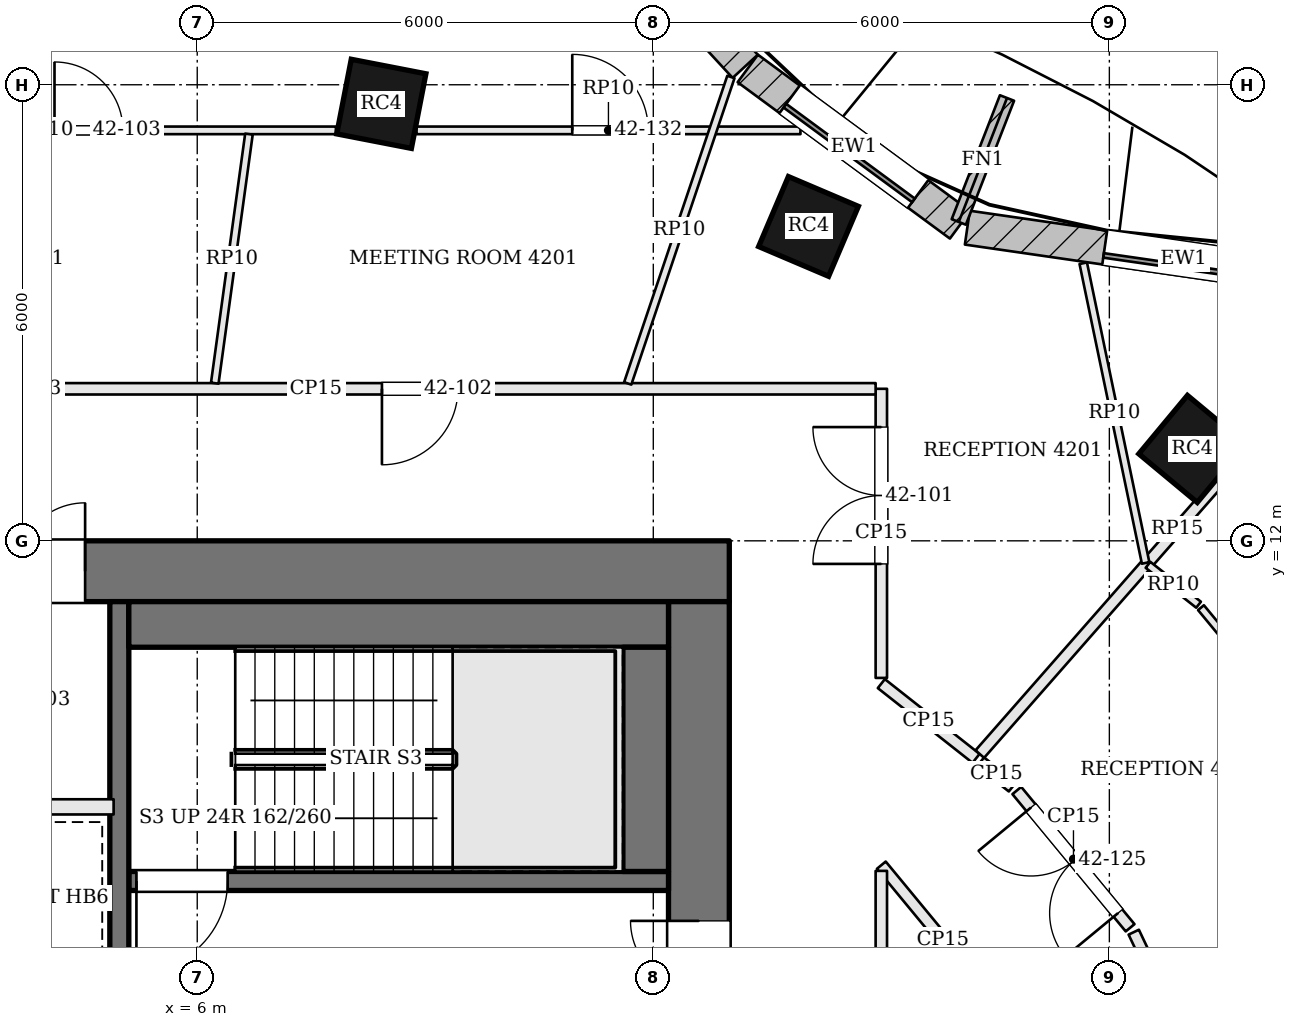
"""IFC4 building model, lengths in metres.
Left out: names, types, materials, properties, quantities, classifications, styles, units other than length and angle.
Written with IfcOpenShell. Run it as: python <this file> out.ifc"""

import sys

from ifc_helpers import new_model, si_unit, direction, frame, frame_2d, origin, origin_2d, place, context, subcontext, project, spatial, rectangle, extrude, element, fill, save


model = new_model("IFC4")
c1 = context("Model", 3, precision=1e-05, world=origin(), true_north=direction((0.0, 1.0)))
c2 = subcontext(c1, "Body", "Model", "MODEL_VIEW")
j1 = project(units=[si_unit("LENGTHUNIT", "METRE"), si_unit("PLANEANGLEUNIT", "RADIAN")], contexts=[c1])
p1 = place(None, origin())
s1 = spatial("IfcSite", under=j1, at=p1, CompositionType="ELEMENT")
p2 = place(p1, origin())
s2 = spatial("IfcBuilding", under=s1, at=p2, CompositionType="ELEMENT")
p3 = place(p2, frame((0.0, 0.0, 174.0)))
s3 = spatial("IfcBuildingStorey", under=s2, at=p3, CompositionType="ELEMENT", Elevation=174.0)
p4 = place(p3, frame((-13.0, 11.6, 0.0), z_axis=(0.0, 0.0, 1.0), x_axis=(1.0, 0.0, 0.0)))
e1 = element("IfcWall", 1, at=p4, inside=s3, PredefinedType="SHEAR", context=c2, shape_type="SweptSolid", body=[
    extrude(rectangle(XDim=26.0, YDim=0.8, at=frame_2d((13.0, 0.0))), origin(), (0.0, 0.0, 1.0), 3.9),
])
p5 = place(p4, frame((9.375, 0.0, 0.0)))
e2 = element("IfcOpeningElement", 2, at=p5, cuts=e1, PredefinedType="OPENING", context=c2, shape_type="SweptSolid", body=[
    extrude(rectangle(XDim=0.7, YDim=2.1, at=frame_2d((0.35, 1.05))), frame((0.0, 0.41, 0.0), z_axis=(0.0, -1.0, 0.0), x_axis=(1.0, 0.0, 0.0)), (0.0, 0.0, 1.0), 0.82),
])
p6 = place(p4, frame((12.075, 0.0, 0.0)))
e3 = element("IfcOpeningElement", 3, at=p6, cuts=e1, PredefinedType="OPENING", context=c2, shape_type="SweptSolid", body=[
    extrude(rectangle(XDim=1.0, YDim=2.1, at=frame_2d((0.5, 1.05))), frame((0.0, 0.41, 0.0), z_axis=(0.0, -1.0, 0.0), x_axis=(1.0, 0.0, 0.0)), (0.0, 0.0, 1.0), 0.82),
])
p7 = place(p4, frame((14.675, 0.0, 0.0)))
e4 = element("IfcOpeningElement", 4, at=p7, cuts=e1, PredefinedType="OPENING", context=c2, shape_type="SweptSolid", body=[
    extrude(rectangle(XDim=0.7, YDim=2.1, at=frame_2d((0.35, 1.05))), frame((0.0, 0.41, 0.0), z_axis=(0.0, -1.0, 0.0), x_axis=(1.0, 0.0, 0.0)), (0.0, 0.0, 1.0), 0.82),
])
p8 = place(p4, frame((16.625, 0.0, 0.0)))
e5 = element("IfcOpeningElement", 5, at=p8, cuts=e1, PredefinedType="OPENING", context=c2, shape_type="SweptSolid", body=[
    extrude(rectangle(XDim=0.9, YDim=2.1, at=frame_2d((0.45, 1.05))), frame((0.0, 0.41, 0.0), z_axis=(0.0, -1.0, 0.0), x_axis=(1.0, 0.0, 0.0)), (0.0, 0.0, 1.0), 0.82),
])
p9 = place(p3, frame((12.6, -2.2, 0.0), z_axis=(0.0, 0.0, 1.0), x_axis=(0.0, 1.0, 0.0)))
e6 = element("IfcWall", 6, at=p9, inside=s3, PredefinedType="SHEAR", context=c2, shape_type="SweptSolid", body=[
    extrude(rectangle(XDim=13.4, YDim=0.8, at=frame_2d((6.7, 0.0))), origin(), (0.0, 0.0, 1.0), 3.9),
])
p10 = place(p9, frame((7.4, 0.0, 0.0)))
e7 = element("IfcOpeningElement", 7, at=p10, cuts=e6, PredefinedType="OPENING", context=c2, shape_type="SweptSolid", body=[
    extrude(rectangle(XDim=1.8, YDim=2.1, at=frame_2d((0.9, 1.05))), frame((0.0, 0.41, 0.0), z_axis=(0.0, -1.0, 0.0), x_axis=(1.0, 0.0, 0.0)), (0.0, 0.0, 1.0), 0.82),
])
for number, where, z_axis, x_axis in (
    (8, (19.092, 13.209, -0.7), (0.0, 0.0, 1.0), (-0.769, 0.639, 0.0)),
    (9, (14.042, 16.136, -0.7), (0.0, 0.0, 1.0), (-0.92, 0.392, 0.0)),
    (10, (8.422, 17.749, -0.7), (0.0, 0.0, 1.0), (-0.982, 0.191, 0.0)),
):
    element("IfcColumn", number, at=place(p3, frame(where, z_axis=z_axis, x_axis=x_axis)), inside=s3, PredefinedType="COLUMN", context=c2, shape_type="SweptSolid", body=[
        extrude(rectangle(XDim=1.0, YDim=1.0, at=origin_2d()), origin(), (0.0, 0.0, 1.0), 4.6),
    ])
p11 = place(p3, frame((21.825, 15.297, 0.0), z_axis=(0.0, 0.0, 1.0), x_axis=(-0.98971474215, 0.143054986527, 0.0)))
e11 = element("IfcWall", 11, at=p11, inside=s3, PredefinedType="SOLIDWALL", context=c2, shape_type="SweptSolid", body=[
    extrude(rectangle(XDim=5.753, YDim=0.45, at=frame_2d((2.876, 0.0))), origin(), (0.0, 0.0, 1.0), 3.7),
])
p12 = place(p11, frame((1.826, 0.0, 0.9)))
e12 = element("IfcOpeningElement", 12, at=p12, cuts=e11, PredefinedType="OPENING", context=c2, shape_type="SweptSolid", body=[
    extrude(rectangle(XDim=2.1, YDim=2.3, at=frame_2d((1.05, 1.15))), frame((0.0, 0.235, 0.0), z_axis=(0.0, -1.0, 0.0), x_axis=(1.0, 0.0, 0.0)), (0.0, 0.0, 1.0), 0.47),
])
p13 = place(p3, frame((16.036, 16.158, 0.0), z_axis=(0.0, 0.0, 1.0), x_axis=(-0.805181432967, 0.593028549064, 0.0)))
e13 = element("IfcWall", 13, at=p13, inside=s3, PredefinedType="SOLIDWALL", context=c2, shape_type="SweptSolid", body=[
    extrude(rectangle(XDim=3.469, YDim=0.45, at=frame_2d((1.734, 0.0))), origin(), (0.0, 0.0, 1.0), 3.7),
])
p14 = place(p13, frame((0.684, 0.0, 0.9)))
e14 = element("IfcOpeningElement", 14, at=p14, cuts=e13, PredefinedType="OPENING", context=c2, shape_type="SweptSolid", body=[
    extrude(rectangle(XDim=2.1, YDim=2.3, at=frame_2d((1.05, 1.15))), frame((0.0, 0.235, 0.0), z_axis=(0.0, -1.0, 0.0), x_axis=(1.0, 0.0, 0.0)), (0.0, 0.0, 1.0), 0.47),
])
p15 = place(p3, frame((13.209, 18.243, 0.0), z_axis=(0.0, 0.0, 1.0), x_axis=(-0.677612152497, 0.735419452278, 0.0)))
e15 = element("IfcWall", 15, at=p15, inside=s3, PredefinedType="SOLIDWALL", context=c2, shape_type="SweptSolid", body=[
    extrude(rectangle(XDim=3.797, YDim=0.45, at=frame_2d((1.898, 0.0))), origin(), (0.0, 0.0, 1.0), 3.7),
])
p16 = place(p15, frame((0.848, 0.0, 0.9)))
e16 = element("IfcOpeningElement", 16, at=p16, cuts=e15, PredefinedType="OPENING", context=c2, shape_type="SweptSolid", body=[
    extrude(rectangle(XDim=2.1, YDim=2.3, at=frame_2d((1.05, 1.15))), frame((0.0, 0.235, 0.0), z_axis=(0.0, -1.0, 0.0), x_axis=(1.0, 0.0, 0.0)), (0.0, 0.0, 1.0), 0.47),
])
p17 = place(p3, frame((16.019, 16.195, 0.0), z_axis=(0.0, 0.0, 1.0), x_axis=(0.362641522028, 0.931928713208, 0.0)))
e17 = element("IfcWall", 17, at=p17, inside=s3, PredefinedType="SOLIDWALL", context=c2, shape_type="SweptSolid", body=[
    extrude(rectangle(XDim=1.75, YDim=0.2, at=frame_2d((0.875, 0.0))), origin(), (0.0, 0.0, 1.0), 3.7),
])
p18 = place(p3, frame((12.2, 7.525, 0.0), z_axis=(0.0, 0.0, 1.0), x_axis=(-1.0, 0.0, 0.0)))
e18 = element("IfcWall", 18, at=p18, inside=s3, PredefinedType="SOLIDWALL", context=c2, shape_type="SweptSolid", body=[
    extrude(rectangle(XDim=7.1, YDim=0.25, at=frame_2d((3.55, 0.0))), origin(), (0.0, 0.0, 1.0), 3.7),
])
p19 = place(p18, frame((5.8, 0.0, 0.0)))
e19 = element("IfcOpeningElement", 19, at=p19, cuts=e18, PredefinedType="OPENING", context=c2, shape_type="SweptSolid", body=[
    extrude(rectangle(XDim=1.2, YDim=2.1, at=frame_2d((0.6, 1.05))), frame((0.0, 0.135, 0.0), z_axis=(0.0, -1.0, 0.0), x_axis=(1.0, 0.0, 0.0)), (0.0, 0.0, 1.0), 0.27),
])
p20 = place(p3, frame((4.975, 11.2, 0.0), z_axis=(0.0, 0.0, 1.0), x_axis=(0.0, -1.0, 0.0)))
e20 = element("IfcWall", 20, at=p20, inside=s3, PredefinedType="SOLIDWALL", context=c2, shape_type="SweptSolid", body=[
    extrude(rectangle(XDim=13.4, YDim=0.25, at=frame_2d((6.7, 0.0))), origin(), (0.0, 0.0, 1.0), 3.7),
])
p21 = place(p20, frame((5.25, 0.0, 0.0)))
e21 = element("IfcOpeningElement", 21, at=p21, cuts=e20, PredefinedType="OPENING", context=c2, shape_type="SweptSolid", body=[
    extrude(rectangle(XDim=1.2, YDim=2.1, at=frame_2d((0.6, 1.05))), frame((0.0, 0.135, 0.0), z_axis=(0.0, -1.0, 0.0), x_axis=(1.0, 0.0, 0.0)), (0.0, 0.0, 1.0), 0.27),
])
p22 = place(p3, frame((12.2, 10.9, 0.0), z_axis=(0.0, 0.0, 1.0), x_axis=(-1.0, 0.0, 0.0)))
e22 = element("IfcWall", 22, at=p22, inside=s3, PredefinedType="SOLIDWALL", context=c2, shape_type="SweptSolid", body=[
    extrude(rectangle(XDim=7.1, YDim=0.6, at=frame_2d((3.55, 0.0))), origin(), (0.0, 0.0, 1.0), 3.7),
])
p23 = place(p3, frame((11.9, 10.6, 0.0), z_axis=(0.0, 0.0, 1.0), x_axis=(0.0, -1.0, 0.0)))
e23 = element("IfcWall", 23, at=p23, inside=s3, PredefinedType="SOLIDWALL", context=c2, shape_type="SweptSolid", body=[
    extrude(rectangle(XDim=2.95, YDim=0.6, at=frame_2d((1.475, 0.0))), origin(), (0.0, 0.0, 1.0), 3.7),
])
p24 = place(p3, frame((-4.9, 8.5, 0.0), z_axis=(0.0, 0.0, 1.0), x_axis=(1.0, 0.0, 0.0)))
e24 = element("IfcWall", 24, at=p24, inside=s3, PredefinedType="SOLIDWALL", context=c2, shape_type="SweptSolid", body=[
    extrude(rectangle(XDim=9.8, YDim=0.2, at=frame_2d((4.9, 0.0))), origin(), (0.0, 0.0, 1.0), 3.7),
])
p25 = place(p3, frame((16.246, 9.138, 0.0), z_axis=(0.0, 0.0, 1.0), x_axis=(-0.785126783061, 0.619335074512, 0.0)))
e25 = element("IfcWall", 25, at=p25, inside=s3, PredefinedType="PARTITIONING", context=c2, shape_type="SweptSolid", body=[
    extrude(rectangle(XDim=1.587, YDim=0.15, at=frame_2d((0.794, 0.0))), origin(), (0.0, 0.0, 1.0), 3.084),
])
p26 = place(p3, frame((15.0, 10.196, 0.0), z_axis=(0.0, 0.0, 1.0), x_axis=(0.0, 1.0, 0.0)))
e26 = element("IfcWall", 26, at=p26, inside=s3, PredefinedType="PARTITIONING", context=c2, shape_type="SweptSolid", body=[
    extrude(rectangle(XDim=3.804, YDim=0.15, at=frame_2d((1.902, 0.0))), origin(), (0.0, 0.0, 1.0), 3.084),
])
p27 = place(p26, frame((1.5, 0.0, 0.0)))
e27 = element("IfcOpeningElement", 27, at=p27, cuts=e26, PredefinedType="OPENING", context=c2, shape_type="SweptSolid", body=[
    extrude(rectangle(XDim=1.8, YDim=2.1, at=frame_2d((0.9, 1.05))), frame((0.0, 0.085, 0.0), z_axis=(0.0, -1.0, 0.0), x_axis=(1.0, 0.0, 0.0)), (0.0, 0.0, 1.0), 0.17),
])
p28 = place(p3, frame((14.925, 14.0, 0.0), z_axis=(0.0, 0.0, 1.0), x_axis=(-1.0, 0.0, 0.0)))
e28 = element("IfcWall", 28, at=p28, inside=s3, PredefinedType="PARTITIONING", context=c2, shape_type="SweptSolid", body=[
    extrude(rectangle(XDim=14.725, YDim=0.15, at=frame_2d((7.362, 0.0))), origin(), (0.0, 0.0, 1.0), 3.084),
])
p29 = place(p28, frame((5.495, 0.0, 0.0)))
e29 = element("IfcOpeningElement", 29, at=p29, cuts=e28, PredefinedType="OPENING", context=c2, shape_type="SweptSolid", body=[
    extrude(rectangle(XDim=1.0, YDim=2.4, at=frame_2d((0.5, 1.2))), frame((0.0, 0.085, 0.0), z_axis=(0.0, -1.0, 0.0), x_axis=(1.0, 0.0, 0.0)), (0.0, 0.0, 1.0), 0.17),
])
p30 = place(p28, frame((11.15, 0.0, 0.0)))
e30 = element("IfcOpeningElement", 30, at=p30, cuts=e28, PredefinedType="OPENING", context=c2, shape_type="SweptSolid", body=[
    extrude(rectangle(XDim=1.0, YDim=2.1, at=frame_2d((0.5, 1.05))), frame((0.0, 0.085, 0.0), z_axis=(0.0, -1.0, 0.0), x_axis=(1.0, 0.0, 0.0)), (0.0, 0.0, 1.0), 0.17),
])
p31 = place(p3, frame((21.493, 15.114, 0.0), z_axis=(0.0, 0.0, 1.0), x_axis=(-0.659778549164, -0.751460089467, 0.0)))
e31 = element("IfcWall", 31, at=p31, inside=s3, PredefinedType="PARTITIONING", context=c2, shape_type="SweptSolid", body=[
    extrude(rectangle(XDim=7.877, YDim=0.15, at=frame_2d((3.938, 0.0))), origin(), (0.0, 0.0, 1.0), 3.234),
])
p32 = place(p3, frame((26.367, 8.789, 0.0), z_axis=(0.0, 0.0, 1.0), x_axis=(-0.913673557468, -0.406448804137, 0.0)))
e32 = element("IfcWall", 32, at=p32, inside=s3, PredefinedType="PARTITIONING", context=c2, shape_type="SweptSolid", body=[
    extrude(rectangle(XDim=8.029, YDim=0.15, at=frame_2d((4.014, 0.0))), origin(), (0.0, 0.0, 1.0), 3.234),
])
p33 = place(p3, frame((18.931, 5.563, 0.0), z_axis=(0.0, 0.0, 1.0), x_axis=(-0.428204145682, 0.903682029046, 0.0)))
e33 = element("IfcWall", 33, at=p33, inside=s3, PredefinedType="PARTITIONING", context=c2, shape_type="SweptSolid", body=[
    extrude(rectangle(XDim=1.425, YDim=0.15, at=frame_2d((0.713, 0.0))), origin(), (0.0, 0.0, 1.0), 3.084),
])
p34 = place(p3, frame((18.273, 6.909, 0.0), z_axis=(0.0, 0.0, 1.0), x_axis=(-0.63653648943, 0.771246586783, 0.0)))
e34 = element("IfcWall", 34, at=p34, inside=s3, PredefinedType="PARTITIONING", context=c2, shape_type="SweptSolid", body=[
    extrude(rectangle(XDim=2.342, YDim=0.15, at=frame_2d((1.171, 0.0))), origin(), (0.0, 0.0, 1.0), 3.084),
])
p35 = place(p34, frame((0.25, 0.0, 0.0)))
e35 = element("IfcOpeningElement", 35, at=p35, cuts=e34, PredefinedType="OPENING", context=c2, shape_type="SweptSolid", body=[
    extrude(rectangle(XDim=1.8, YDim=2.1, at=frame_2d((0.9, 1.05))), frame((0.0, 0.085, 0.0), z_axis=(0.0, -1.0, 0.0), x_axis=(1.0, 0.0, 0.0)), (0.0, 0.0, 1.0), 0.17),
])
p36 = place(p3, frame((16.724, 8.761, 0.0), z_axis=(0.0, 0.0, 1.0), x_axis=(-0.785093642841, 0.619377083827, 0.0)))
e36 = element("IfcWall", 36, at=p36, inside=s3, PredefinedType="PARTITIONING", context=c2, shape_type="SweptSolid", body=[
    extrude(rectangle(XDim=0.533, YDim=0.15, at=frame_2d((0.267, 0.0))), origin(), (0.0, 0.0, 1.0), 3.084),
])
p37 = place(p3, frame((15.0, 7.733, 0.0), z_axis=(0.0, 0.0, 1.0), x_axis=(0.636601263488, -0.771193121938, 0.0)))
e37 = element("IfcWall", 37, at=p37, inside=s3, PredefinedType="PARTITIONING", context=c2, shape_type="SweptSolid", body=[
    extrude(rectangle(XDim=2.545, YDim=0.15, at=frame_2d((1.272, 0.0))), origin(), (0.0, 0.0, 1.0), 3.084),
])
p38 = place(p3, frame((15.0, -4.925, 0.0), z_axis=(0.0, 0.0, 1.0), x_axis=(0.0, 1.0, 0.0)))
e38 = element("IfcWall", 38, at=p38, inside=s3, PredefinedType="PARTITIONING", context=c2, shape_type="SweptSolid", body=[
    extrude(rectangle(XDim=12.583, YDim=0.15, at=frame_2d((6.292, 0.0))), origin(), (0.0, 0.0, 1.0), 3.084),
])
p39 = place(p38, frame((6.441, 0.0, 0.0)))
e39 = element("IfcOpeningElement", 39, at=p39, cuts=e38, PredefinedType="OPENING", context=c2, shape_type="SweptSolid", body=[
    extrude(rectangle(XDim=0.7, YDim=2.1, at=frame_2d((0.35, 1.05))), frame((0.0, 0.085, 0.0), z_axis=(0.0, -1.0, 0.0), x_axis=(1.0, 0.0, 0.0)), (0.0, 0.0, 1.0), 0.17),
])
p40 = place(p3, frame((0.228, 17.4, 0.0), z_axis=(0.0, 0.0, 1.0), x_axis=(1.0, 0.0, 0.0)))
e40 = element("IfcWall", 40, at=p40, inside=s3, PredefinedType="PARTITIONING", context=c2, shape_type="SweptSolid", body=[
    extrude(rectangle(XDim=7.596, YDim=0.1, at=frame_2d((3.798, 0.0))), origin(), (0.0, 0.0, 1.0), 3.084),
])
p41 = place(p40, frame((3.894, 0.0, 0.0)))
e41 = element("IfcOpeningElement", 41, at=p41, cuts=e40, PredefinedType="OPENING", context=c2, shape_type="SweptSolid", body=[
    extrude(rectangle(XDim=0.9, YDim=2.1, at=frame_2d((0.45, 1.05))), frame((0.0, 0.06, 0.0), z_axis=(0.0, -1.0, 0.0), x_axis=(1.0, 0.0, 0.0)), (0.0, 0.0, 1.0), 0.12),
])
p42 = place(p3, frame((8.884, 17.4, 0.0), z_axis=(0.0, 0.0, 1.0), x_axis=(1.0, 0.0, 0.0)))
e42 = element("IfcWall", 42, at=p42, inside=s3, PredefinedType="PARTITIONING", context=c2, shape_type="SweptSolid", body=[
    extrude(rectangle(XDim=5.052, YDim=0.1, at=frame_2d((2.526, 0.0))), origin(), (0.0, 0.0, 1.0), 3.084),
])
p43 = place(p42, frame((2.05, 0.0, 0.0)))
e43 = element("IfcOpeningElement", 43, at=p43, cuts=e42, PredefinedType="OPENING", context=c2, shape_type="SweptSolid", body=[
    extrude(rectangle(XDim=1.0, YDim=2.4, at=frame_2d((0.5, 1.2))), frame((0.0, 0.06, 0.0), z_axis=(0.0, -1.0, 0.0), x_axis=(1.0, 0.0, 0.0)), (0.0, 0.0, 1.0), 0.12),
])
p44 = place(p3, frame((17.656, 15.652, 0.0), z_axis=(0.0, 0.0, 1.0), x_axis=(0.203733969948, -0.979026286414, 0.0)))
e44 = element("IfcWall", 44, at=p44, inside=s3, PredefinedType="PARTITIONING", context=c2, shape_type="SweptSolid", body=[
    extrude(rectangle(XDim=4.028, YDim=0.1, at=frame_2d((2.014, 0.0))), origin(), (0.0, 0.0, 1.0), 3.084),
])
p45 = place(p3, frame((11.664, 14.071, 0.0), z_axis=(0.0, 0.0, 1.0), x_axis=(0.319050122348, 0.947737843198, 0.0)))
e45 = element("IfcWall", 45, at=p45, inside=s3, PredefinedType="PARTITIONING", context=c2, shape_type="SweptSolid", body=[
    extrude(rectangle(XDim=4.254, YDim=0.1, at=frame_2d((2.127, 0.0))), origin(), (0.0, 0.0, 1.0), 3.084),
])
p46 = place(p3, frame((6.231, 14.074, 0.0), z_axis=(0.0, 0.0, 1.0), x_axis=(0.135982862237, 0.990711189589, 0.0)))
e46 = element("IfcWall", 46, at=p46, inside=s3, PredefinedType="PARTITIONING", context=c2, shape_type="SweptSolid", body=[
    extrude(rectangle(XDim=3.307, YDim=0.1, at=frame_2d((1.654, 0.0))), origin(), (0.0, 0.0, 1.0), 3.084),
])
p47 = place(p3, frame((18.508, 11.684, 0.0), z_axis=(0.0, 0.0, 1.0), x_axis=(0.785067093858, -0.619410734603, 0.0)))
e47 = element("IfcWall", 47, at=p47, inside=s3, PredefinedType="PARTITIONING", context=c2, shape_type="SweptSolid", body=[
    extrude(rectangle(XDim=0.847, YDim=0.1, at=frame_2d((0.424, 0.0))), origin(), (0.0, 0.0, 1.0), 3.084),
])
p48 = place(p3, frame((19.206, 11.121, 0.0), z_axis=(0.0, 0.0, 1.0), x_axis=(0.636597206989, -0.771196470462, 0.0)))
e48 = element("IfcWall", 48, at=p48, inside=s3, PredefinedType="PARTITIONING", context=c2, shape_type="SweptSolid", body=[
    extrude(rectangle(XDim=3.152, YDim=0.1, at=frame_2d((1.576, 0.0))), origin(), (0.0, 0.0, 1.0), 3.084),
])
p49 = place(p48, frame((1.619, 0.0, 0.0)))
e49 = element("IfcOpeningElement", 49, at=p49, cuts=e48, PredefinedType="OPENING", context=c2, shape_type="SweptSolid", body=[
    extrude(rectangle(XDim=1.0, YDim=2.1, at=frame_2d((0.5, 1.05))), frame((0.0, 0.06, 0.0), z_axis=(0.0, -1.0, 0.0), x_axis=(1.0, 0.0, 0.0)), (0.0, 0.0, 1.0), 0.12),
])
p50 = place(p12, origin())
e50 = element("IfcWindow", 50, at=p50, inside=s3, PartitioningType="SINGLE_PANEL", PredefinedType="WINDOW", context=c2, shape_type="SweptSolid", body=[
    extrude(rectangle(XDim=2.1, YDim=2.3, at=frame_2d((1.05, 1.15))), frame((0.0, 0.135, 0.0), z_axis=(0.0, -1.0, 0.0), x_axis=(1.0, 0.0, 0.0)), (0.0, 0.0, 1.0), 0.06),
])
fill(e12, e50)
p51 = place(p14, origin())
e51 = element("IfcWindow", 51, at=p51, inside=s3, PartitioningType="SINGLE_PANEL", PredefinedType="WINDOW", context=c2, shape_type="SweptSolid", body=[
    extrude(rectangle(XDim=2.1, YDim=2.3, at=frame_2d((1.05, 1.15))), frame((0.0, 0.135, 0.0), z_axis=(0.0, -1.0, 0.0), x_axis=(1.0, 0.0, 0.0)), (0.0, 0.0, 1.0), 0.06),
])
fill(e14, e51)
p52 = place(p10, origin())
e52 = element("IfcDoor", 52, at=p52, inside=s3, OperationType="DOUBLE_DOOR_SINGLE_SWING", PredefinedType="DOOR", context=c2, shape_type="SweptSolid", body=[
    extrude(rectangle(XDim=1.8, YDim=2.1, at=frame_2d((0.9, 1.05))), frame((0.0, 0.025, 0.0), z_axis=(0.0, -1.0, 0.0), x_axis=(1.0, 0.0, 0.0)), (0.0, 0.0, 1.0), 0.05),
])
fill(e7, e52)
p53 = place(p19, origin())
e53 = element("IfcDoor", 53, at=p53, inside=s3, OperationType="SINGLE_SWING_RIGHT", PredefinedType="DOOR", context=c2, shape_type="SweptSolid", body=[
    extrude(rectangle(XDim=1.2, YDim=2.1, at=frame_2d((0.6, 1.05))), frame((0.0, 0.025, 0.0), z_axis=(0.0, -1.0, 0.0), x_axis=(1.0, 0.0, 0.0)), (0.0, 0.0, 1.0), 0.05),
])
fill(e19, e53)
p54 = place(p8, origin())
e54 = element("IfcDoor", 54, at=p54, inside=s3, OperationType="SINGLE_SWING_RIGHT", PredefinedType="DOOR", context=c2, shape_type="SweptSolid", body=[
    extrude(rectangle(XDim=0.9, YDim=2.1, at=frame_2d((0.45, 1.05))), frame((0.0, 0.025, 0.0), z_axis=(0.0, -1.0, 0.0), x_axis=(1.0, 0.0, 0.0)), (0.0, 0.0, 1.0), 0.05),
])
fill(e5, e54)
p55 = place(p27, origin())
e55 = element("IfcDoor", 55, at=p55, inside=s3, OperationType="DOUBLE_DOOR_SINGLE_SWING", PredefinedType="DOOR", context=c2, shape_type="SweptSolid", body=[
    extrude(rectangle(XDim=1.8, YDim=2.1, at=frame_2d((0.9, 1.05))), frame((0.0, 0.025, 0.0), z_axis=(0.0, -1.0, 0.0), x_axis=(1.0, 0.0, 0.0)), (0.0, 0.0, 1.0), 0.05),
])
fill(e27, e55)
p56 = place(p29, origin())
e56 = element("IfcDoor", 56, at=p56, inside=s3, OperationType="SINGLE_SWING_RIGHT", PredefinedType="DOOR", context=c2, shape_type="SweptSolid", body=[
    extrude(rectangle(XDim=1.0, YDim=2.4, at=frame_2d((0.5, 1.2))), frame((0.0, 0.025, 0.0), z_axis=(0.0, -1.0, 0.0), x_axis=(1.0, 0.0, 0.0)), (0.0, 0.0, 1.0), 0.05),
])
fill(e29, e56)
p57 = place(p41, origin())
e57 = element("IfcDoor", 57, at=p57, inside=s3, OperationType="SINGLE_SWING_LEFT", PredefinedType="DOOR", context=c2, shape_type="SweptSolid", body=[
    extrude(rectangle(XDim=0.9, YDim=2.1, at=frame_2d((0.45, 1.05))), frame((0.0, 0.025, 0.0), z_axis=(0.0, -1.0, 0.0), x_axis=(1.0, 0.0, 0.0)), (0.0, 0.0, 1.0), 0.05),
])
fill(e41, e57)
p58 = place(p35, origin())
e58 = element("IfcDoor", 58, at=p58, inside=s3, OperationType="DOUBLE_DOOR_SINGLE_SWING", PredefinedType="DOOR", context=c2, shape_type="SweptSolid", body=[
    extrude(rectangle(XDim=1.8, YDim=2.1, at=frame_2d((0.9, 1.05))), frame((0.0, 0.025, 0.0), z_axis=(0.0, -1.0, 0.0), x_axis=(1.0, 0.0, 0.0)), (0.0, 0.0, 1.0), 0.05),
])
fill(e35, e58)
p59 = place(p43, origin())
e59 = element("IfcDoor", 59, at=p59, inside=s3, OperationType="SINGLE_SWING_LEFT", PredefinedType="DOOR", context=c2, shape_type="SweptSolid", body=[
    extrude(rectangle(XDim=1.0, YDim=2.4, at=frame_2d((0.5, 1.2))), frame((0.0, 0.025, 0.0), z_axis=(0.0, -1.0, 0.0), x_axis=(1.0, 0.0, 0.0)), (0.0, 0.0, 1.0), 0.05),
])
fill(e43, e59)
save(model, sys.argv[1])
